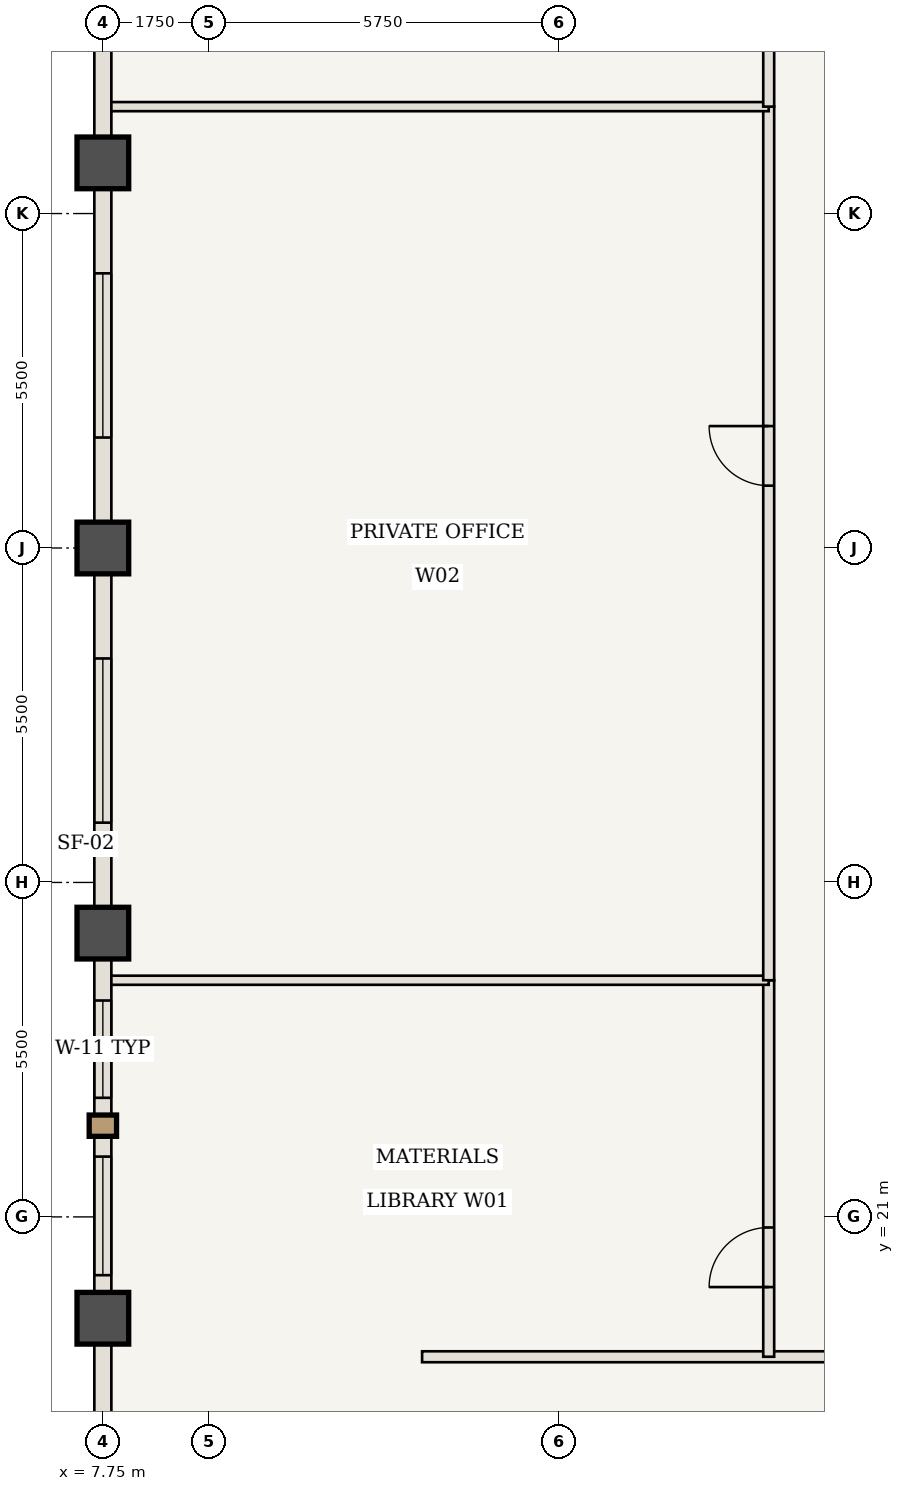
"""IFC4 building model, lengths in metres.
Left out: names, types, materials, properties, quantities, classifications, styles, units other than length and angle.
Written with IfcOpenShell. Run it as: python <this file> out.ifc"""

import sys

from ifc_helpers import new_model, si_unit, direction, frame, frame_2d, origin, origin_2d, place, context, subcontext, project, spatial, rectangle, extrude, element, fill, save


model = new_model("IFC4")
c1 = context("Model", 3, precision=1e-05, world=origin(), true_north=direction((0.0, 1.0)))
c2 = subcontext(c1, "Body", "Model", "MODEL_VIEW")
j1 = project(units=[si_unit("LENGTHUNIT", "METRE"), si_unit("PLANEANGLEUNIT", "RADIAN")], contexts=[c1])
p1 = place(None, origin())
s1 = spatial("IfcSite", under=j1, at=p1, CompositionType="ELEMENT")
p2 = place(p1, origin())
s2 = spatial("IfcBuilding", under=s1, at=p2, CompositionType="ELEMENT")
p3 = place(p2, frame((0.0, 0.0, 213.85)))
s3 = spatial("IfcBuildingStorey", under=s2, at=p3, CompositionType="ELEMENT", Elevation=213.85)
for number, where, z_axis, x_axis in (
    (1, (7.75, 19.333, 0.0), (0.0, 0.0, 1.0), (1.0, 0.0, 0.0)),
    (2, (7.75, 25.667, 0.0), (0.0, 0.0, 1.0), (1.0, 0.0, 0.0)),
    (3, (7.75, 32.0, 0.0), (0.0, 0.0, 1.0), (1.0, 0.0, 0.0)),
    (4, (7.75, 38.333, 0.0), (0.0, 0.0, 1.0), (1.0, 0.0, 0.0)),
):
    element("IfcColumn", number, at=place(p3, frame(where, z_axis=z_axis, x_axis=x_axis)), inside=s3, PredefinedType="COLUMN", context=c2, shape_type="SweptSolid", body=[
        extrude(rectangle(XDim=0.85, YDim=0.85, at=origin_2d()), origin(), (0.0, 0.0, 1.0), 3.85),
    ])
p4 = place(p3, frame((13.0, 18.7, 0.0), z_axis=(0.0, 0.0, 1.0), x_axis=(1.0, 0.0, 0.0)))
e5 = element("IfcWall", 5, at=p4, inside=s3, PredefinedType="STANDARD", context=c2, shape_type="SweptSolid", body=[
    extrude(rectangle(XDim=19.925, YDim=0.18, at=frame_2d((9.962, 0.0))), origin(), (0.0, 0.0, 1.0), 3.685),
])
p5 = place(p4, frame((12.312, 0.0, 0.0)))
e6 = element("IfcOpeningElement", 6, at=p5, cuts=e5, PredefinedType="OPENING", context=c2, shape_type="SweptSolid", body=[
    extrude(rectangle(XDim=0.98, YDim=2.2, at=frame_2d((0.49, 1.1))), frame((0.0, 0.1, 0.0), z_axis=(0.0, -1.0, 0.0), x_axis=(1.0, 0.0, 0.0)), (0.0, 0.0, 1.0), 0.2),
])
p6 = place(p3, frame((18.7, 18.7, 0.0), z_axis=(0.0, 0.0, 1.0), x_axis=(0.0, 1.0, 0.0)))
e7 = element("IfcWall", 7, at=p6, inside=s3, PredefinedType="STANDARD", context=c2, shape_type="SweptSolid", body=[
    extrude(rectangle(XDim=6.192, YDim=0.18, at=frame_2d((3.096, 0.0))), origin(), (0.0, 0.0, 1.0), 3.685),
])
p7 = place(p6, frame((1.146, 0.0, 0.0)))
e8 = element("IfcOpeningElement", 8, at=p7, cuts=e7, PredefinedType="OPENING", context=c2, shape_type="SweptSolid", body=[
    extrude(rectangle(XDim=0.98, YDim=2.2, at=frame_2d((0.49, 1.1))), frame((0.0, 0.1, 0.0), z_axis=(0.0, -1.0, 0.0), x_axis=(1.0, 0.0, 0.0)), (0.0, 0.0, 1.0), 0.2),
])
p8 = place(p3, frame((7.81, 24.892, 0.0), z_axis=(0.0, 0.0, 1.0), x_axis=(1.0, 0.0, 0.0)))
e9 = element("IfcWall", 9, at=p8, inside=s3, PredefinedType="STANDARD", context=c2, shape_type="SweptSolid", body=[
    extrude(rectangle(XDim=10.89, YDim=0.15, at=frame_2d((5.445, 0.0))), origin(), (0.0, 0.0, 1.0), 3.685),
])
p9 = place(p3, frame((18.7, 24.892, 0.0), z_axis=(0.0, 0.0, 1.0), x_axis=(0.0, 1.0, 0.0)))
e10 = element("IfcWall", 10, at=p9, inside=s3, PredefinedType="STANDARD", context=c2, shape_type="SweptSolid", body=[
    extrude(rectangle(XDim=14.367, YDim=0.18, at=frame_2d((7.183, 0.0))), origin(), (0.0, 0.0, 1.0), 3.685),
])
p10 = place(p9, frame((8.133, 0.0, 0.0)))
e11 = element("IfcOpeningElement", 11, at=p10, cuts=e10, PredefinedType="OPENING", context=c2, shape_type="SweptSolid", body=[
    extrude(rectangle(XDim=0.98, YDim=2.2, at=frame_2d((0.49, 1.1))), frame((0.0, 0.1, 0.0), z_axis=(0.0, -1.0, 0.0), x_axis=(1.0, 0.0, 0.0)), (0.0, 0.0, 1.0), 0.2),
])
p11 = place(p3, frame((7.81, 39.258, 0.0), z_axis=(0.0, 0.0, 1.0), x_axis=(1.0, 0.0, 0.0)))
e12 = element("IfcWall", 12, at=p11, inside=s3, PredefinedType="STANDARD", context=c2, shape_type="SweptSolid", body=[
    extrude(rectangle(XDim=10.89, YDim=0.15, at=frame_2d((5.445, 0.0))), origin(), (0.0, 0.0, 1.0), 3.685),
])
p12 = place(p3, frame((18.7, 39.258, 0.0), z_axis=(0.0, 0.0, 1.0), x_axis=(0.0, 1.0, 0.0)))
e13 = element("IfcWall", 13, at=p12, inside=s3, PredefinedType="STANDARD", context=c2, shape_type="SweptSolid", body=[
    extrude(rectangle(XDim=6.042, YDim=0.18, at=frame_2d((3.021, 0.0))), origin(), (0.0, 0.0, 1.0), 3.685),
])
p13 = place(p12, frame((1.071, 0.0, 0.0)))
e14 = element("IfcOpeningElement", 14, at=p13, cuts=e13, PredefinedType="OPENING", context=c2, shape_type="SweptSolid", body=[
    extrude(rectangle(XDim=0.98, YDim=2.2, at=frame_2d((0.49, 1.1))), frame((0.0, 0.1, 0.0), z_axis=(0.0, -1.0, 0.0), x_axis=(1.0, 0.0, 0.0)), (0.0, 0.0, 1.0), 0.2),
])
p14 = place(p3, frame((7.75, 13.0, 0.0), z_axis=(0.0, 0.0, 1.0), x_axis=(0.0, 1.0, 0.0)))
e15 = element("IfcWall", 15, at=p14, inside=s3, PredefinedType="USERDEFINED", context=c2, shape_type="SweptSolid", body=[
    extrude(rectangle(XDim=6.333, YDim=0.28, at=frame_2d((3.167, 0.0))), origin(), (0.0, 0.0, 1.0), 2.985),
])
p15 = place(p3, frame((7.75, 19.333, 0.0), z_axis=(0.0, 0.0, 1.0), x_axis=(0.0, 1.0, 0.0)))
e16 = element("IfcWall", 16, at=p15, inside=s3, PredefinedType="USERDEFINED", context=c2, shape_type="SweptSolid", body=[
    extrude(rectangle(XDim=6.333, YDim=0.28, at=frame_2d((3.167, 0.0))), origin(), (0.0, 0.0, 1.0), 2.985),
])
p16 = place(p15, frame((0.708, 0.0, 0.85)))
e17 = element("IfcOpeningElement", 17, at=p16, cuts=e16, PredefinedType="OPENING", context=c2, shape_type="SweptSolid", body=[
    extrude(rectangle(XDim=1.95, YDim=1.935, at=frame_2d((0.975, 0.968))), frame((0.0, 0.15, 0.0), z_axis=(0.0, -1.0, 0.0), x_axis=(1.0, 0.0, 0.0)), (0.0, 0.0, 1.0), 0.3),
])
p17 = place(p15, frame((3.625, 0.0, 0.85)))
e18 = element("IfcOpeningElement", 18, at=p17, cuts=e16, PredefinedType="OPENING", context=c2, shape_type="SweptSolid", body=[
    extrude(rectangle(XDim=1.6, YDim=1.935, at=frame_2d((0.8, 0.968))), frame((0.0, 0.15, 0.0), z_axis=(0.0, -1.0, 0.0), x_axis=(1.0, 0.0, 0.0)), (0.0, 0.0, 1.0), 0.3),
])
p18 = place(p3, frame((7.75, 25.667, 0.0), z_axis=(0.0, 0.0, 1.0), x_axis=(0.0, 1.0, 0.0)))
e19 = element("IfcWall", 19, at=p18, inside=s3, PredefinedType="USERDEFINED", context=c2, shape_type="SweptSolid", body=[
    extrude(rectangle(XDim=6.333, YDim=0.28, at=frame_2d((3.167, 0.0))), origin(), (0.0, 0.0, 1.0), 2.985),
])
p19 = place(p18, frame((1.817, 0.0, 0.85)))
e20 = element("IfcOpeningElement", 20, at=p19, cuts=e19, PredefinedType="OPENING", context=c2, shape_type="SweptSolid", body=[
    extrude(rectangle(XDim=2.7, YDim=1.935, at=frame_2d((1.35, 0.968))), frame((0.0, 0.15, 0.0), z_axis=(0.0, -1.0, 0.0), x_axis=(1.0, 0.0, 0.0)), (0.0, 0.0, 1.0), 0.3),
])
p20 = place(p3, frame((7.75, 32.0, 0.0), z_axis=(0.0, 0.0, 1.0), x_axis=(0.0, 1.0, 0.0)))
e21 = element("IfcWall", 21, at=p20, inside=s3, PredefinedType="USERDEFINED", context=c2, shape_type="SweptSolid", body=[
    extrude(rectangle(XDim=6.333, YDim=0.28, at=frame_2d((3.167, 0.0))), origin(), (0.0, 0.0, 1.0), 2.985),
])
p21 = place(p20, frame((1.817, 0.0, 0.85)))
e22 = element("IfcOpeningElement", 22, at=p21, cuts=e21, PredefinedType="OPENING", context=c2, shape_type="SweptSolid", body=[
    extrude(rectangle(XDim=2.7, YDim=1.935, at=frame_2d((1.35, 0.968))), frame((0.0, 0.15, 0.0), z_axis=(0.0, -1.0, 0.0), x_axis=(1.0, 0.0, 0.0)), (0.0, 0.0, 1.0), 0.3),
])
p22 = place(p3, frame((7.75, 38.333, 0.0), z_axis=(0.0, 0.0, 1.0), x_axis=(0.0, 1.0, 0.0)))
e23 = element("IfcWall", 23, at=p22, inside=s3, PredefinedType="USERDEFINED", context=c2, shape_type="SweptSolid", body=[
    extrude(rectangle(XDim=6.333, YDim=0.28, at=frame_2d((3.167, 0.0))), origin(), (0.0, 0.0, 1.0), 2.985),
])
p23 = place(p22, frame((3.675, 0.0, 0.85)))
e24 = element("IfcOpeningElement", 24, at=p23, cuts=e23, PredefinedType="OPENING", context=c2, shape_type="SweptSolid", body=[
    extrude(rectangle(XDim=1.95, YDim=1.935, at=frame_2d((0.975, 0.968))), frame((0.0, 0.15, 0.0), z_axis=(0.0, -1.0, 0.0), x_axis=(1.0, 0.0, 0.0)), (0.0, 0.0, 1.0), 0.3),
])
p24 = place(p7, origin())
e25 = element("IfcDoor", 25, at=p24, inside=s3, OperationType="SINGLE_SWING_LEFT", PredefinedType="DOOR", context=c2, shape_type="SweptSolid", body=[
    extrude(rectangle(XDim=0.98, YDim=2.2, at=frame_2d((0.49, 1.1))), frame((0.0, 0.025, 0.0), z_axis=(0.0, -1.0, 0.0), x_axis=(1.0, 0.0, 0.0)), (0.0, 0.0, 1.0), 0.05),
])
fill(e8, e25)
p25 = place(p10, origin())
e26 = element("IfcDoor", 26, at=p25, inside=s3, OperationType="SINGLE_SWING_RIGHT", PredefinedType="DOOR", context=c2, shape_type="SweptSolid", body=[
    extrude(rectangle(XDim=0.98, YDim=2.2, at=frame_2d((0.49, 1.1))), frame((0.0, 0.025, 0.0), z_axis=(0.0, -1.0, 0.0), x_axis=(1.0, 0.0, 0.0)), (0.0, 0.0, 1.0), 0.05),
])
fill(e11, e26)
p26 = place(p16, origin())
e27 = element("IfcWindow", 27, at=p26, inside=s3, PartitioningType="SINGLE_PANEL", PredefinedType="WINDOW", context=c2, shape_type="SweptSolid", body=[
    extrude(rectangle(XDim=1.95, YDim=1.935, at=frame_2d((0.975, 0.968))), frame((0.0, 0.03, 0.0), z_axis=(0.0, -1.0, 0.0), x_axis=(1.0, 0.0, 0.0)), (0.0, 0.0, 1.0), 0.06),
])
fill(e17, e27)
p27 = place(p17, origin())
e28 = element("IfcWindow", 28, at=p27, inside=s3, PartitioningType="SINGLE_PANEL", PredefinedType="WINDOW", context=c2, shape_type="SweptSolid", body=[
    extrude(rectangle(XDim=1.6, YDim=1.935, at=frame_2d((0.8, 0.968))), frame((0.0, 0.03, 0.0), z_axis=(0.0, -1.0, 0.0), x_axis=(1.0, 0.0, 0.0)), (0.0, 0.0, 1.0), 0.06),
])
fill(e18, e28)
p28 = place(p19, origin())
e29 = element("IfcWindow", 29, at=p28, inside=s3, PartitioningType="SINGLE_PANEL", PredefinedType="WINDOW", context=c2, shape_type="SweptSolid", body=[
    extrude(rectangle(XDim=2.7, YDim=1.935, at=frame_2d((1.35, 0.968))), frame((0.0, 0.03, 0.0), z_axis=(0.0, -1.0, 0.0), x_axis=(1.0, 0.0, 0.0)), (0.0, 0.0, 1.0), 0.06),
])
fill(e20, e29)
p29 = place(p21, origin())
e30 = element("IfcWindow", 30, at=p29, inside=s3, PartitioningType="SINGLE_PANEL", PredefinedType="WINDOW", context=c2, shape_type="SweptSolid", body=[
    extrude(rectangle(XDim=2.7, YDim=1.935, at=frame_2d((1.35, 0.968))), frame((0.0, 0.03, 0.0), z_axis=(0.0, -1.0, 0.0), x_axis=(1.0, 0.0, 0.0)), (0.0, 0.0, 1.0), 0.06),
])
fill(e22, e30)
save(model, sys.argv[1])
